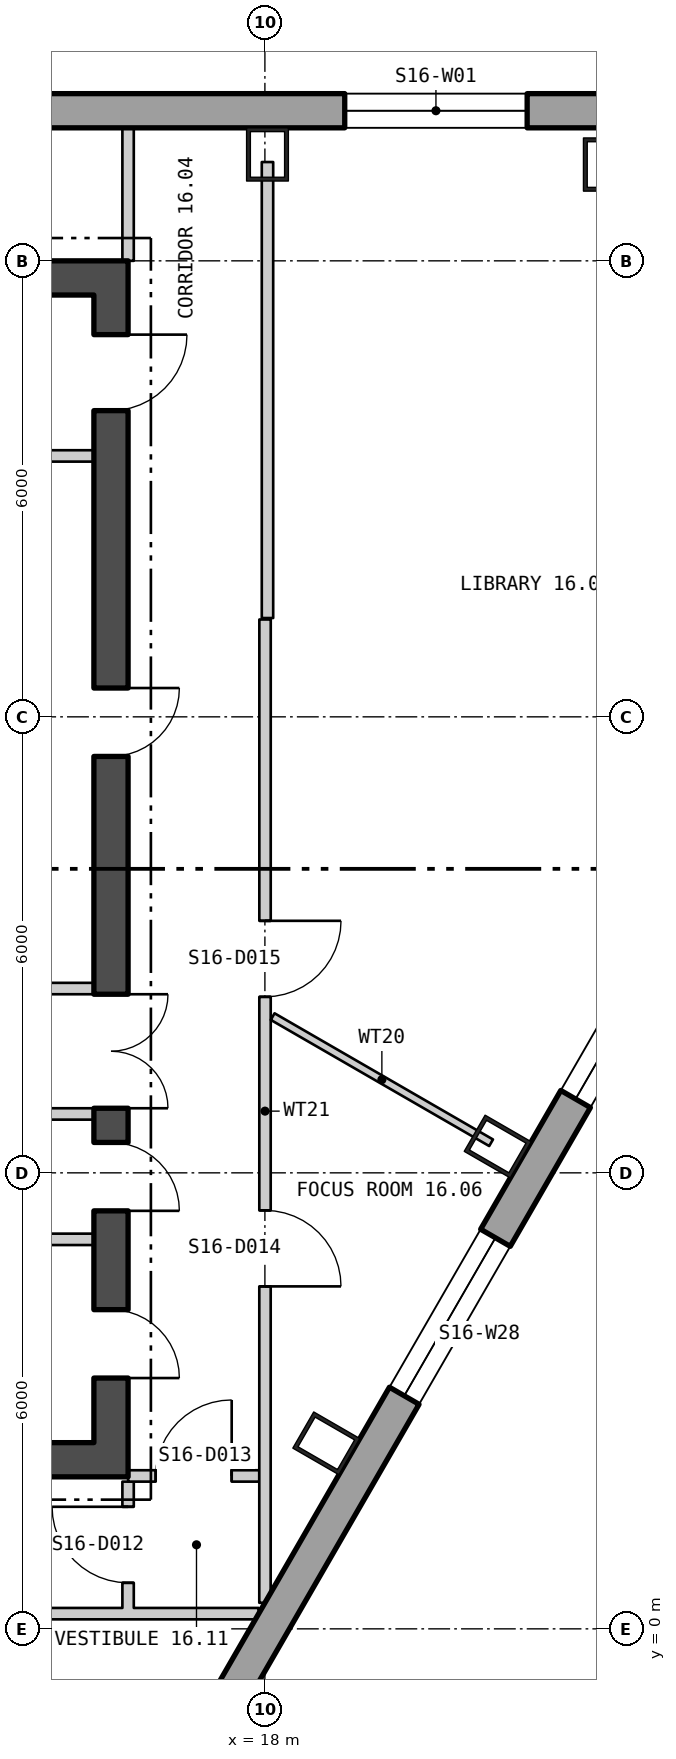
"""IFC4 building model, lengths in metres.
Left out: names, types, materials, properties, quantities, classifications, styles, units other than length and angle.
Written with IfcOpenShell. Run it as: python <this file> out.ifc"""

import sys

from ifc_helpers import new_model, si_unit, direction, frame, frame_2d, origin, origin_2d, place, context, subcontext, project, spatial, polyline, rectangle, hollow_rectangle, outline, extrude, element, fill, save


model = new_model("IFC4")
c1 = context("Model", 3, precision=1e-05, world=origin(), true_north=direction((0.0, 1.0)))
c2 = subcontext(c1, "Body", "Model", "MODEL_VIEW")
j1 = project(units=[si_unit("LENGTHUNIT", "METRE"), si_unit("PLANEANGLEUNIT", "RADIAN")], contexts=[c1])
p1 = place(None, origin())
s1 = spatial("IfcSite", under=j1, at=p1, CompositionType="ELEMENT")
p2 = place(p1, origin())
s2 = spatial("IfcBuilding", under=s1, at=p2, CompositionType="ELEMENT")
p3 = place(p2, frame((0.0, 0.0, 216.0)))
s3 = spatial("IfcBuildingStorey", under=s2, at=p3, CompositionType="ELEMENT", Elevation=216.0)
for number, where, z_axis, x_axis in (
    (1, (22.466, 19.267, 0.0), (0.0, 0.0, 1.0), (-1.0, 0.0, 0.0)),
    (2, (18.034, 19.4, 0.0), (0.0, 0.0, 1.0), (-1.0, 0.0, 0.0)),
    (3, (18.808, 2.441, 0.0), (0.0, 0.0, 1.0), (0.5, 0.866, 0.0)),
    (4, (21.063, 6.346, 0.0), (0.0, 0.0, 1.0), (0.5, 0.866, 0.0)),
):
    element("IfcColumn", number, at=place(p3, frame(where, z_axis=z_axis, x_axis=x_axis)), inside=s3, PredefinedType="COLUMN", context=c2, shape_type="SweptSolid", body=[
        extrude(hollow_rectangle(XDim=0.55, YDim=0.7, WallThickness=0.05, at=origin_2d()), origin(), (0.0, 0.0, 1.0), 3.9),
    ])
p4 = place(p3, frame((22.875, 19.975, -0.4), z_axis=(0.0, 0.0, 1.0), x_axis=(-1.0, 0.0, 0.0)))
e5 = element("IfcWall", 5, at=p4, inside=s3, PredefinedType="SOLIDWALL", context=c2, shape_type="SweptSolid", body=[
    extrude(outline(polyline([(-0.13, -0.225), (45.88, -0.225), (45.62, 0.225), (0.13, 0.225), (-0.13, -0.225)])), origin(), (0.0, 0.0, 1.0), 3.9),
])
p5 = place(p4, frame((1.425, 0.0, 1.3)))
e6 = element("IfcOpeningElement", 6, at=p5, cuts=e5, PredefinedType="OPENING", context=c2, shape_type="SweptSolid", body=[
    extrude(rectangle(XDim=2.4, YDim=2.0, at=frame_2d((1.2, 1.0))), frame((0.0, 0.235, 0.0), z_axis=(0.0, -1.0, 0.0), x_axis=(1.0, 0.0, 0.0)), (0.0, 0.0, 1.0), 0.47),
])
p6 = place(p4, frame((10.403, 0.0, 1.3)))
e7 = element("IfcOpeningElement", 7, at=p6, cuts=e5, PredefinedType="OPENING", context=c2, shape_type="SweptSolid", body=[
    extrude(rectangle(XDim=2.4, YDim=2.0, at=frame_2d((1.2, 1.0))), frame((0.0, 0.235, 0.0), z_axis=(0.0, -1.0, 0.0), x_axis=(1.0, 0.0, 0.0)), (0.0, 0.0, 1.0), 0.47),
])
p7 = place(p4, frame((14.912, 0.0, 1.3)))
e8 = element("IfcOpeningElement", 8, at=p7, cuts=e5, PredefinedType="OPENING", context=c2, shape_type="SweptSolid", body=[
    extrude(rectangle(XDim=2.4, YDim=2.0, at=frame_2d((1.2, 1.0))), frame((0.0, 0.235, 0.0), z_axis=(0.0, -1.0, 0.0), x_axis=(1.0, 0.0, 0.0)), (0.0, 0.0, 1.0), 0.47),
])
p8 = place(p4, frame((19.421, 0.0, 1.3)))
e9 = element("IfcOpeningElement", 9, at=p8, cuts=e5, PredefinedType="OPENING", context=c2, shape_type="SweptSolid", body=[
    extrude(rectangle(XDim=2.4, YDim=2.0, at=frame_2d((1.2, 1.0))), frame((0.0, 0.235, 0.0), z_axis=(0.0, -1.0, 0.0), x_axis=(1.0, 0.0, 0.0)), (0.0, 0.0, 1.0), 0.47),
])
p9 = place(p4, frame((23.929, 0.0, 1.3)))
e10 = element("IfcOpeningElement", 10, at=p9, cuts=e5, PredefinedType="OPENING", context=c2, shape_type="SweptSolid", body=[
    extrude(rectangle(XDim=2.4, YDim=2.0, at=frame_2d((1.2, 1.0))), frame((0.0, 0.235, 0.0), z_axis=(0.0, -1.0, 0.0), x_axis=(1.0, 0.0, 0.0)), (0.0, 0.0, 1.0), 0.47),
])
p10 = place(p4, frame((28.438, 0.0, 1.3)))
e11 = element("IfcOpeningElement", 11, at=p10, cuts=e5, PredefinedType="OPENING", context=c2, shape_type="SweptSolid", body=[
    extrude(rectangle(XDim=2.4, YDim=2.0, at=frame_2d((1.2, 1.0))), frame((0.0, 0.235, 0.0), z_axis=(0.0, -1.0, 0.0), x_axis=(1.0, 0.0, 0.0)), (0.0, 0.0, 1.0), 0.47),
])
p11 = place(p4, frame((32.947, 0.0, 1.3)))
e12 = element("IfcOpeningElement", 12, at=p11, cuts=e5, PredefinedType="OPENING", context=c2, shape_type="SweptSolid", body=[
    extrude(rectangle(XDim=2.4, YDim=2.0, at=frame_2d((1.2, 1.0))), frame((0.0, 0.235, 0.0), z_axis=(0.0, -1.0, 0.0), x_axis=(1.0, 0.0, 0.0)), (0.0, 0.0, 1.0), 0.47),
])
p12 = place(p4, frame((37.455, 0.0, 1.3)))
e13 = element("IfcOpeningElement", 13, at=p12, cuts=e5, PredefinedType="OPENING", context=c2, shape_type="SweptSolid", body=[
    extrude(rectangle(XDim=2.4, YDim=2.0, at=frame_2d((1.2, 1.0))), frame((0.0, 0.235, 0.0), z_axis=(0.0, -1.0, 0.0), x_axis=(1.0, 0.0, 0.0)), (0.0, 0.0, 1.0), 0.47),
])
p13 = place(p4, frame((41.925, 0.0, 1.3)))
e14 = element("IfcOpeningElement", 14, at=p13, cuts=e5, PredefinedType="OPENING", context=c2, shape_type="SweptSolid", body=[
    extrude(rectangle(XDim=2.4, YDim=2.0, at=frame_2d((1.2, 1.0))), frame((0.0, 0.235, 0.0), z_axis=(0.0, -1.0, 0.0), x_axis=(1.0, 0.0, 0.0)), (0.0, 0.0, 1.0), 0.47),
])
p14 = place(p3, frame((3.36, -25.466, -0.18), z_axis=(0.0, 0.0, 1.0), x_axis=(0.500000335318, 0.866025210188, 0.0)))
e15 = element("IfcWall", 15, at=p14, inside=s3, PredefinedType="SOLIDWALL", context=c2, shape_type="SweptSolid", body=[
    extrude(outline(polyline([(-0.13, -0.225), (45.88, -0.225), (45.62, 0.225), (0.13, 0.225), (-0.13, -0.225)])), origin(), (0.0, 0.0, 1.0), 3.68),
])
p15 = place(p14, frame((1.425, 0.0, 1.08)))
e16 = element("IfcOpeningElement", 16, at=p15, cuts=e15, PredefinedType="OPENING", context=c2, shape_type="SweptSolid", body=[
    extrude(rectangle(XDim=2.4, YDim=2.0, at=frame_2d((1.2, 1.0))), frame((0.0, 0.235, 0.0), z_axis=(0.0, -1.0, 0.0), x_axis=(1.0, 0.0, 0.0)), (0.0, 0.0, 1.0), 0.47),
])
p16 = place(p14, frame((5.895, 0.0, 1.08)))
e17 = element("IfcOpeningElement", 17, at=p16, cuts=e15, PredefinedType="OPENING", context=c2, shape_type="SweptSolid", body=[
    extrude(rectangle(XDim=2.4, YDim=2.0, at=frame_2d((1.2, 1.0))), frame((0.0, 0.235, 0.0), z_axis=(0.0, -1.0, 0.0), x_axis=(1.0, 0.0, 0.0)), (0.0, 0.0, 1.0), 0.47),
])
p17 = place(p14, frame((10.403, 0.0, 1.08)))
e18 = element("IfcOpeningElement", 18, at=p17, cuts=e15, PredefinedType="OPENING", context=c2, shape_type="SweptSolid", body=[
    extrude(rectangle(XDim=2.4, YDim=2.0, at=frame_2d((1.2, 1.0))), frame((0.0, 0.235, 0.0), z_axis=(0.0, -1.0, 0.0), x_axis=(1.0, 0.0, 0.0)), (0.0, 0.0, 1.0), 0.47),
])
p18 = place(p14, frame((14.912, 0.0, 1.08)))
e19 = element("IfcOpeningElement", 19, at=p18, cuts=e15, PredefinedType="OPENING", context=c2, shape_type="SweptSolid", body=[
    extrude(rectangle(XDim=2.4, YDim=2.0, at=frame_2d((1.2, 1.0))), frame((0.0, 0.235, 0.0), z_axis=(0.0, -1.0, 0.0), x_axis=(1.0, 0.0, 0.0)), (0.0, 0.0, 1.0), 0.47),
])
p19 = place(p14, frame((19.421, 0.0, 1.08)))
e20 = element("IfcOpeningElement", 20, at=p19, cuts=e15, PredefinedType="OPENING", context=c2, shape_type="SweptSolid", body=[
    extrude(rectangle(XDim=2.4, YDim=2.0, at=frame_2d((1.2, 1.0))), frame((0.0, 0.235, 0.0), z_axis=(0.0, -1.0, 0.0), x_axis=(1.0, 0.0, 0.0)), (0.0, 0.0, 1.0), 0.47),
])
p20 = place(p14, frame((23.929, 0.0, 1.08)))
e21 = element("IfcOpeningElement", 21, at=p20, cuts=e15, PredefinedType="OPENING", context=c2, shape_type="SweptSolid", body=[
    extrude(rectangle(XDim=2.4, YDim=2.0, at=frame_2d((1.2, 1.0))), frame((0.0, 0.235, 0.0), z_axis=(0.0, -1.0, 0.0), x_axis=(1.0, 0.0, 0.0)), (0.0, 0.0, 1.0), 0.47),
])
p21 = place(p14, frame((32.947, 0.0, 1.08)))
e22 = element("IfcOpeningElement", 22, at=p21, cuts=e15, PredefinedType="OPENING", context=c2, shape_type="SweptSolid", body=[
    extrude(rectangle(XDim=2.4, YDim=2.0, at=frame_2d((1.2, 1.0))), frame((0.0, 0.235, 0.0), z_axis=(0.0, -1.0, 0.0), x_axis=(1.0, 0.0, 0.0)), (0.0, 0.0, 1.0), 0.47),
])
p22 = place(p14, frame((37.455, 0.0, 1.08)))
e23 = element("IfcOpeningElement", 23, at=p22, cuts=e15, PredefinedType="OPENING", context=c2, shape_type="SweptSolid", body=[
    extrude(rectangle(XDim=2.4, YDim=2.0, at=frame_2d((1.2, 1.0))), frame((0.0, 0.235, 0.0), z_axis=(0.0, -1.0, 0.0), x_axis=(1.0, 0.0, 0.0)), (0.0, 0.0, 1.0), 0.47),
])
p23 = place(p14, frame((41.925, 0.0, 1.08)))
e24 = element("IfcOpeningElement", 24, at=p23, cuts=e15, PredefinedType="OPENING", context=c2, shape_type="SweptSolid", body=[
    extrude(rectangle(XDim=2.4, YDim=2.0, at=frame_2d((1.2, 1.0))), frame((0.0, 0.235, 0.0), z_axis=(0.0, -1.0, 0.0), x_axis=(1.0, 0.0, 0.0)), (0.0, 0.0, 1.0), 0.47),
])
p24 = place(p3, frame((-16.2, 2.225, 0.0), z_axis=(0.0, 0.0, 1.0), x_axis=(1.0, 0.0, 0.0)))
e25 = element("IfcWall", 25, at=p24, inside=s3, PredefinedType="SHEAR", context=c2, shape_type="SweptSolid", body=[
    extrude(rectangle(XDim=32.4, YDim=0.45, at=frame_2d((16.2, 0.0))), origin(), (0.0, 0.0, 1.0), 3.7),
])
p25 = place(p24, frame((10.7, 0.0, 0.0)))
e26 = element("IfcOpeningElement", 26, at=p25, cuts=e25, PredefinedType="OPENING", context=c2, shape_type="SweptSolid", body=[
    extrude(rectangle(XDim=1.8, YDim=2.4, at=frame_2d((0.9, 1.2))), frame((0.0, 0.235, 0.0), z_axis=(0.0, -1.0, 0.0), x_axis=(1.0, 0.0, 0.0)), (0.0, 0.0, 1.0), 0.47),
])
p26 = place(p24, frame((20.7, 0.0, 0.0)))
e27 = element("IfcOpeningElement", 27, at=p26, cuts=e25, PredefinedType="OPENING", context=c2, shape_type="SweptSolid", body=[
    extrude(rectangle(XDim=1.8, YDim=2.4, at=frame_2d((0.9, 1.2))), frame((0.0, 0.235, 0.0), z_axis=(0.0, -1.0, 0.0), x_axis=(1.0, 0.0, 0.0)), (0.0, 0.0, 1.0), 0.47),
])
p27 = place(p3, frame((-16.2, 17.775, 0.0), z_axis=(0.0, 0.0, 1.0), x_axis=(1.0, 0.0, 0.0)))
e28 = element("IfcWall", 28, at=p27, inside=s3, PredefinedType="SHEAR", context=c2, shape_type="SweptSolid", body=[
    extrude(rectangle(XDim=32.4, YDim=0.45, at=frame_2d((16.2, 0.0))), origin(), (0.0, 0.0, 1.0), 3.7),
])
p28 = place(p3, frame((15.975, 2.45, 0.0), z_axis=(0.0, 0.0, 1.0), x_axis=(0.0, 1.0, 0.0)))
e29 = element("IfcWall", 29, at=p28, inside=s3, PredefinedType="SHEAR", context=c2, shape_type="SweptSolid", body=[
    extrude(rectangle(XDim=15.1, YDim=0.45, at=frame_2d((7.55, 0.0))), origin(), (0.0, 0.0, 1.0), 3.7),
])
p29 = place(p28, frame((4.4, 0.0, 0.0)))
e30 = element("IfcOpeningElement", 30, at=p29, cuts=e29, PredefinedType="OPENING", context=c2, shape_type="SweptSolid", body=[
    extrude(rectangle(XDim=1.5, YDim=2.1, at=frame_2d((0.75, 1.05))), frame((0.0, 0.235, 0.0), z_axis=(0.0, -1.0, 0.0), x_axis=(1.0, 0.0, 0.0)), (0.0, 0.0, 1.0), 0.47),
])
p30 = place(p28, frame((0.85, 0.0, 0.0)))
e31 = element("IfcOpeningElement", 31, at=p30, cuts=e29, PredefinedType="OPENING", context=c2, shape_type="SweptSolid", body=[
    extrude(rectangle(XDim=0.9, YDim=2.1, at=frame_2d((0.45, 1.05))), frame((0.0, 0.235, 0.0), z_axis=(0.0, -1.0, 0.0), x_axis=(1.0, 0.0, 0.0)), (0.0, 0.0, 1.0), 0.47),
])
p31 = place(p28, frame((3.05, 0.0, 0.0)))
e32 = element("IfcOpeningElement", 32, at=p31, cuts=e29, PredefinedType="OPENING", context=c2, shape_type="SweptSolid", body=[
    extrude(rectangle(XDim=0.9, YDim=2.1, at=frame_2d((0.45, 1.05))), frame((0.0, 0.235, 0.0), z_axis=(0.0, -1.0, 0.0), x_axis=(1.0, 0.0, 0.0)), (0.0, 0.0, 1.0), 0.47),
])
p32 = place(p28, frame((9.029, 0.0, 0.0)))
e33 = element("IfcOpeningElement", 33, at=p32, cuts=e29, PredefinedType="OPENING", context=c2, shape_type="SweptSolid", body=[
    extrude(rectangle(XDim=0.9, YDim=2.1, at=frame_2d((0.45, 1.05))), frame((0.0, 0.235, 0.0), z_axis=(0.0, -1.0, 0.0), x_axis=(1.0, 0.0, 0.0)), (0.0, 0.0, 1.0), 0.47),
])
p33 = place(p28, frame((13.579, 0.0, 0.0)))
e34 = element("IfcOpeningElement", 34, at=p33, cuts=e29, PredefinedType="OPENING", context=c2, shape_type="SweptSolid", body=[
    extrude(rectangle(XDim=1.0, YDim=2.1, at=frame_2d((0.5, 1.05))), frame((0.0, 0.235, 0.0), z_axis=(0.0, -1.0, 0.0), x_axis=(1.0, 0.0, 0.0)), (0.0, 0.0, 1.0), 0.47),
])
for number, where, z_axis, x_axis in (
    (35, (14.5, 6.775, 0.0), (0.0, 0.0, 1.0), (1.0, 0.0, 0.0)),
    (36, (14.5, 8.425, 0.0), (0.0, 0.0, 1.0), (1.0, 0.0, 0.0)),
    (37, (14.5, 5.125, 0.0), (0.0, 0.0, 1.0), (1.0, 0.0, 0.0)),
    (38, (14.5, 15.433, 0.0), (0.0, 0.0, 1.0), (1.0, 0.0, 0.0)),
):
    element("IfcWall", number, at=place(p3, frame(where, z_axis=z_axis, x_axis=x_axis)), inside=s3, PredefinedType="PARTITIONING", context=c2, shape_type="SweptSolid", body=[
        extrude(rectangle(XDim=1.25, YDim=0.15, at=frame_2d((0.625, 0.0))), origin(), (0.0, 0.0, 1.0), 3.7),
    ])
p34 = place(p3, frame((6.75, 0.2, 0.0), z_axis=(0.0, 0.0, 1.0), x_axis=(1.0, 0.0, 0.0)))
e39 = element("IfcWall", 39, at=p34, inside=s3, PredefinedType="PARTITIONING", context=c2, shape_type="SweptSolid", body=[
    extrude(rectangle(XDim=11.168, YDim=0.15, at=frame_2d((5.584, 0.0))), origin(), (0.0, 0.0, 1.0), 3.7),
])
p35 = place(p34, frame((4.03, 0.0, 0.0)))
e40 = element("IfcOpeningElement", 40, at=p35, cuts=e39, PredefinedType="OPENING", context=c2, shape_type="SweptSolid", body=[
    extrude(rectangle(XDim=1.0, YDim=2.1, at=frame_2d((0.5, 1.05))), frame((0.0, 0.085, 0.0), z_axis=(0.0, -1.0, 0.0), x_axis=(1.0, 0.0, 0.0)), (0.0, 0.0, 1.0), 0.17),
])
p36 = place(p3, frame((16.2, 0.275, 0.0), z_axis=(0.0, 0.0, 1.0), x_axis=(0.0, 1.0, 0.0)))
e41 = element("IfcWall", 41, at=p36, inside=s3, PredefinedType="PARTITIONING", context=c2, shape_type="SweptSolid", body=[
    extrude(rectangle(XDim=1.662, YDim=0.15, at=frame_2d((0.831, 0.0))), origin(), (0.0, 0.0, 1.0), 3.7),
])
p37 = place(p36, frame((0.331, 0.0, 0.0)))
e42 = element("IfcOpeningElement", 42, at=p37, cuts=e41, PredefinedType="OPENING", context=c2, shape_type="SweptSolid", body=[
    extrude(rectangle(XDim=1.0, YDim=2.1, at=frame_2d((0.5, 1.05))), frame((0.0, 0.085, 0.0), z_axis=(0.0, -1.0, 0.0), x_axis=(1.0, 0.0, 0.0)), (0.0, 0.0, 1.0), 0.17),
])
p38 = place(p3, frame((16.2, 2.012, 0.0), z_axis=(0.0, 0.0, 1.0), x_axis=(1.0, 0.0, 0.0)))
e43 = element("IfcWall", 43, at=p38, inside=s3, PredefinedType="PARTITIONING", context=c2, shape_type="SweptSolid", body=[
    extrude(rectangle(XDim=1.726, YDim=0.15, at=frame_2d((0.863, 0.0))), origin(), (0.0, 0.0, 1.0), 3.11),
])
p39 = place(p38, frame((0.363, 0.0, 0.0)))
e44 = element("IfcOpeningElement", 44, at=p39, cuts=e43, PredefinedType="OPENING", context=c2, shape_type="SweptSolid", body=[
    extrude(rectangle(XDim=1.0, YDim=2.1, at=frame_2d((0.5, 1.05))), frame((0.0, 0.085, 0.0), z_axis=(0.0, -1.0, 0.0), x_axis=(1.0, 0.0, 0.0)), (0.0, 0.0, 1.0), 0.17),
])
p40 = place(p3, frame((16.2, 18.0, 0.0), z_axis=(0.0, 0.0, 1.0), x_axis=(0.0, 1.0, 0.0)))
e45 = element("IfcWall", 45, at=p40, inside=s3, PredefinedType="PARTITIONING", context=c2, shape_type="SweptSolid", body=[
    extrude(rectangle(XDim=1.75, YDim=0.15, at=frame_2d((0.875, 0.0))), origin(), (0.0, 0.0, 1.0), 3.7),
])
p41 = place(p3, frame((18.001, 0.343, 0.0), z_axis=(0.0, 0.0, 1.0), x_axis=(7.7291699e-05, 0.999999997013, 0.0)))
e46 = element("IfcWall", 46, at=p41, inside=s3, PredefinedType="PARTITIONING", context=c2, shape_type="SweptSolid", body=[
    extrude(rectangle(XDim=12.938, YDim=0.15, at=frame_2d((6.469, 0.0))), origin(), (0.0, 0.0, 1.0), 3.7),
])
p42 = place(p41, frame((4.163, 0.0, 0.0)))
e47 = element("IfcOpeningElement", 47, at=p42, cuts=e46, PredefinedType="OPENING", context=c2, shape_type="SweptSolid", body=[
    extrude(rectangle(XDim=1.0, YDim=2.1, at=frame_2d((0.5, 1.05))), frame((0.0, 0.085, 0.0), z_axis=(0.0, -1.0, 0.0), x_axis=(1.0, 0.0, 0.0)), (0.0, 0.0, 1.0), 0.17),
])
p43 = place(p41, frame((7.973, 0.0, 0.0)))
e48 = element("IfcOpeningElement", 48, at=p43, cuts=e46, PredefinedType="OPENING", context=c2, shape_type="SweptSolid", body=[
    extrude(rectangle(XDim=1.0, YDim=2.1, at=frame_2d((0.5, 1.05))), frame((0.0, 0.085, 0.0), z_axis=(0.0, -1.0, 0.0), x_axis=(1.0, 0.0, 0.0)), (0.0, 0.0, 1.0), 0.17),
])
p44 = place(p3, frame((18.034, 13.3, 0.0), z_axis=(0.0, 0.0, 1.0), x_axis=(0.0, 1.0, 0.0)))
e49 = element("IfcWall", 49, at=p44, inside=s3, PredefinedType="PARTITIONING", context=c2, shape_type="SweptSolid", body=[
    extrude(rectangle(XDim=6.0, YDim=0.15, at=frame_2d((3.0, 0.0))), origin(), (0.0, 0.0, 1.0), 3.7),
])
p45 = place(p3, frame((18.102, 8.056, 0.0), z_axis=(0.0, 0.0, 1.0), x_axis=(0.865934672737, -0.500157117865, 0.0)))
e50 = element("IfcWall", 50, at=p45, inside=s3, PredefinedType="PARTITIONING", context=c2, shape_type="SweptSolid", body=[
    extrude(rectangle(XDim=3.319, YDim=0.1, at=frame_2d((1.659, 0.0))), origin(), (0.0, 0.0, 1.0), 3.7),
])
p46 = place(p5, origin())
e51 = element("IfcWindow", 51, at=p46, inside=s3, PartitioningType="SINGLE_PANEL", PredefinedType="WINDOW", context=c2, shape_type="SweptSolid", body=[
    extrude(rectangle(XDim=2.4, YDim=2.0, at=frame_2d((1.2, 1.0))), frame((0.0, 0.105, 0.0), z_axis=(0.0, -1.0, 0.0), x_axis=(1.0, 0.0, 0.0)), (0.0, 0.0, 1.0), 0.06),
])
fill(e6, e51)
p47 = place(p21, origin())
e52 = element("IfcWindow", 52, at=p47, inside=s3, PartitioningType="SINGLE_PANEL", PredefinedType="WINDOW", context=c2, shape_type="SweptSolid", body=[
    extrude(rectangle(XDim=2.4, YDim=2.0, at=frame_2d((1.2, 1.0))), frame((0.0, 0.105, 0.0), z_axis=(0.0, -1.0, 0.0), x_axis=(1.0, 0.0, 0.0)), (0.0, 0.0, 1.0), 0.06),
])
fill(e22, e52)
p48 = place(p22, origin())
e53 = element("IfcWindow", 53, at=p48, inside=s3, PartitioningType="SINGLE_PANEL", PredefinedType="WINDOW", context=c2, shape_type="SweptSolid", body=[
    extrude(rectangle(XDim=2.4, YDim=2.0, at=frame_2d((1.2, 1.0))), frame((0.0, 0.105, 0.0), z_axis=(0.0, -1.0, 0.0), x_axis=(1.0, 0.0, 0.0)), (0.0, 0.0, 1.0), 0.06),
])
fill(e23, e53)
p49 = place(p29, origin())
e54 = element("IfcDoor", 54, at=p49, inside=s3, OperationType="DOUBLE_DOOR_SINGLE_SWING", PredefinedType="DOOR", context=c2, shape_type="SweptSolid", body=[
    extrude(rectangle(XDim=1.5, YDim=2.1, at=frame_2d((0.75, 1.05))), frame((0.0, 0.025, 0.0), z_axis=(0.0, -1.0, 0.0), x_axis=(1.0, 0.0, 0.0)), (0.0, 0.0, 1.0), 0.05),
])
fill(e30, e54)
p50 = place(p30, origin())
e55 = element("IfcDoor", 55, at=p50, inside=s3, OperationType="SINGLE_SWING_LEFT", PredefinedType="DOOR", context=c2, shape_type="SweptSolid", body=[
    extrude(rectangle(XDim=0.9, YDim=2.1, at=frame_2d((0.45, 1.05))), frame((0.0, 0.025, 0.0), z_axis=(0.0, -1.0, 0.0), x_axis=(1.0, 0.0, 0.0)), (0.0, 0.0, 1.0), 0.05),
])
fill(e31, e55)
p51 = place(p31, origin())
e56 = element("IfcDoor", 56, at=p51, inside=s3, OperationType="SINGLE_SWING_LEFT", PredefinedType="DOOR", context=c2, shape_type="SweptSolid", body=[
    extrude(rectangle(XDim=0.9, YDim=2.1, at=frame_2d((0.45, 1.05))), frame((0.0, 0.025, 0.0), z_axis=(0.0, -1.0, 0.0), x_axis=(1.0, 0.0, 0.0)), (0.0, 0.0, 1.0), 0.05),
])
fill(e32, e56)
p52 = place(p32, origin())
e57 = element("IfcDoor", 57, at=p52, inside=s3, OperationType="SINGLE_SWING_RIGHT", PredefinedType="DOOR", context=c2, shape_type="SweptSolid", body=[
    extrude(rectangle(XDim=0.9, YDim=2.1, at=frame_2d((0.45, 1.05))), frame((0.0, 0.025, 0.0), z_axis=(0.0, -1.0, 0.0), x_axis=(1.0, 0.0, 0.0)), (0.0, 0.0, 1.0), 0.05),
])
fill(e33, e57)
p53 = place(p33, origin())
e58 = element("IfcDoor", 58, at=p53, inside=s3, OperationType="SINGLE_SWING_RIGHT", PredefinedType="DOOR", context=c2, shape_type="SweptSolid", body=[
    extrude(rectangle(XDim=1.0, YDim=2.1, at=frame_2d((0.5, 1.05))), frame((0.0, 0.025, 0.0), z_axis=(0.0, -1.0, 0.0), x_axis=(1.0, 0.0, 0.0)), (0.0, 0.0, 1.0), 0.05),
])
fill(e34, e58)
p54 = place(p37, origin())
e59 = element("IfcDoor", 59, at=p54, inside=s3, OperationType="SINGLE_SWING_LEFT", PredefinedType="DOOR", context=c2, shape_type="SweptSolid", body=[
    extrude(rectangle(XDim=1.0, YDim=2.1, at=frame_2d((0.5, 1.05))), frame((0.0, 0.025, 0.0), z_axis=(0.0, -1.0, 0.0), x_axis=(1.0, 0.0, 0.0)), (0.0, 0.0, 1.0), 0.05),
])
fill(e42, e59)
p55 = place(p39, origin())
e60 = element("IfcDoor", 60, at=p55, inside=s3, OperationType="SINGLE_SWING_LEFT", PredefinedType="DOOR", context=c2, shape_type="SweptSolid", body=[
    extrude(rectangle(XDim=1.0, YDim=2.1, at=frame_2d((0.5, 1.05))), frame((0.0, 0.025, 0.0), z_axis=(0.0, -1.0, 0.0), x_axis=(1.0, 0.0, 0.0)), (0.0, 0.0, 1.0), 0.05),
])
fill(e44, e60)
p56 = place(p42, origin())
e61 = element("IfcDoor", 61, at=p56, inside=s3, OperationType="SINGLE_SWING_LEFT", PredefinedType="DOOR", context=c2, shape_type="SweptSolid", body=[
    extrude(rectangle(XDim=1.0, YDim=2.1, at=frame_2d((0.5, 1.05))), frame((0.0, 0.025, 0.0), z_axis=(0.0, -1.0, 0.0), x_axis=(1.0, 0.0, 0.0)), (0.0, 0.0, 1.0), 0.05),
])
fill(e47, e61)
p57 = place(p43, origin())
e62 = element("IfcDoor", 62, at=p57, inside=s3, OperationType="SINGLE_SWING_RIGHT", PredefinedType="DOOR", context=c2, shape_type="SweptSolid", body=[
    extrude(rectangle(XDim=1.0, YDim=2.1, at=frame_2d((0.5, 1.05))), frame((0.0, 0.025, 0.0), z_axis=(0.0, -1.0, 0.0), x_axis=(1.0, 0.0, 0.0)), (0.0, 0.0, 1.0), 0.05),
])
fill(e48, e62)
save(model, sys.argv[1])
